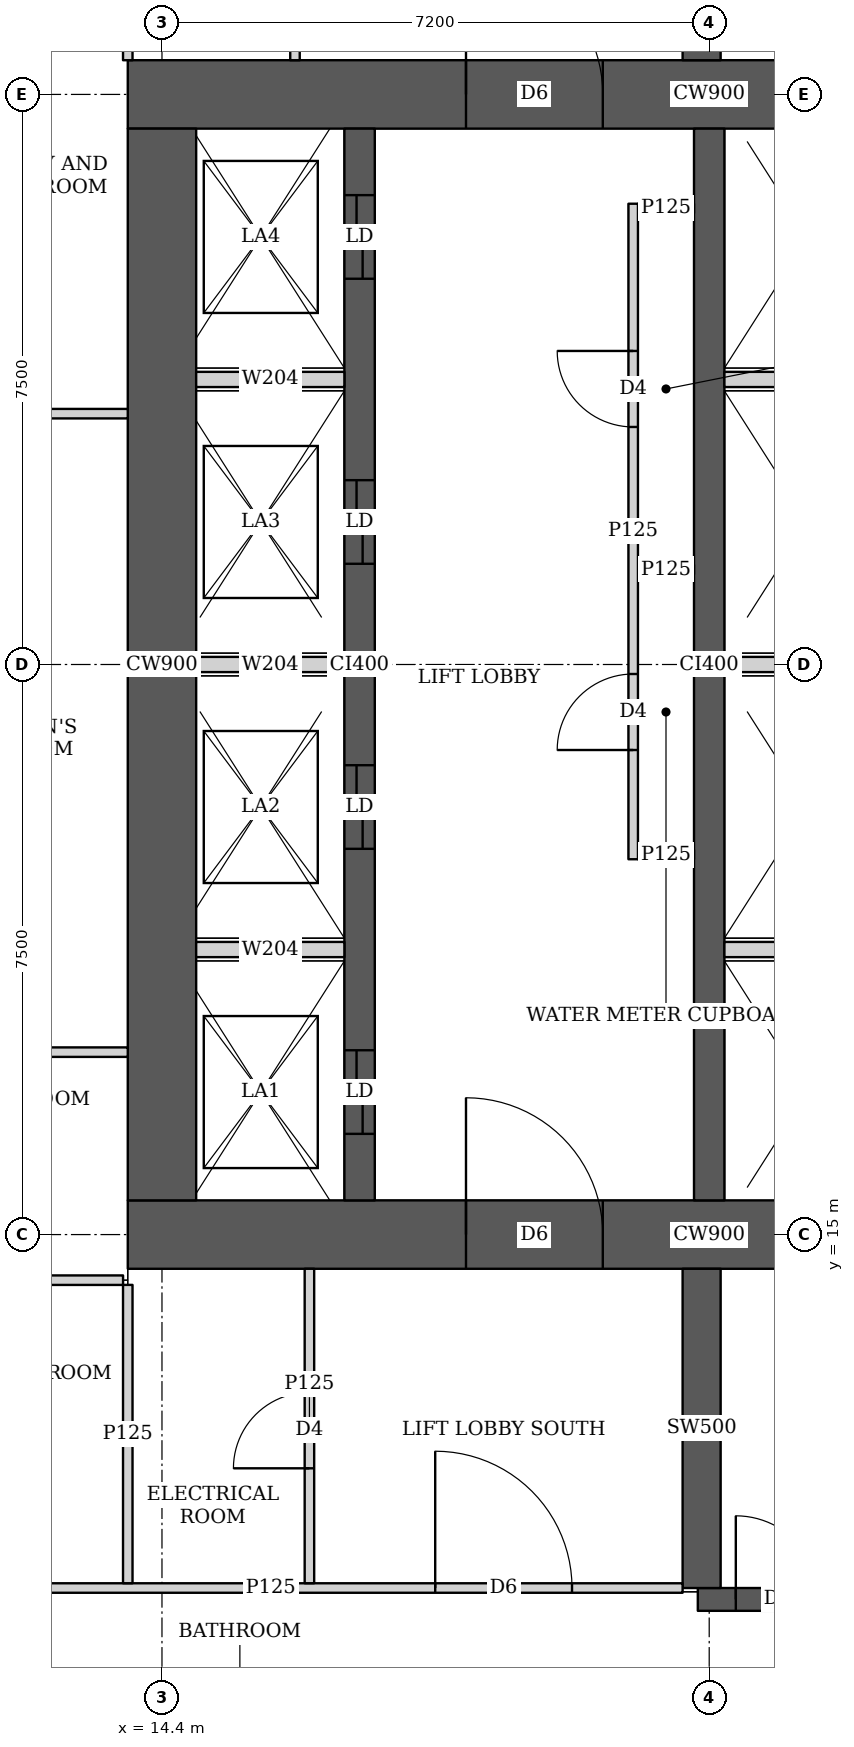
"""IFC4 building model, lengths in metres.
Left out: names, types, materials, properties, quantities, classifications, styles, units other than length and angle.
Written with IfcOpenShell. Run it as: python <this file> out.ifc"""

import sys

from ifc_helpers import new_model, si_unit, direction, frame, frame_2d, origin, place, context, subcontext, project, spatial, rectangle, extrude, element, fill, save


model = new_model("IFC4")
c1 = context("Model", 3, precision=1e-05, world=origin(), true_north=direction((0.0, 1.0)))
c2 = subcontext(c1, "Body", "Model", "MODEL_VIEW")
j1 = project(units=[si_unit("LENGTHUNIT", "METRE"), si_unit("PLANEANGLEUNIT", "RADIAN")], contexts=[c1])
p1 = place(None, origin())
s1 = spatial("IfcSite", under=j1, at=p1, CompositionType="ELEMENT")
p2 = place(p1, origin())
s2 = spatial("IfcBuilding", under=s1, at=p2, CompositionType="ELEMENT")
p3 = place(p2, frame((0.0, 0.0, 111.65)))
s3 = spatial("IfcBuildingStorey", under=s2, at=p3, CompositionType="ELEMENT", Elevation=111.65)
p4 = place(p3, frame((13.95, 15.0, 0.0), z_axis=(0.0, 0.0, 1.0), x_axis=(1.0, 0.0, 0.0)))
e1 = element("IfcWall", 1, at=p4, inside=s3, PredefinedType="SHEAR", context=c2, shape_type="SweptSolid", body=[
    extrude(rectangle(XDim=15.3, YDim=0.9, at=frame_2d((7.65, 0.0))), origin(), (0.0, 0.0, 1.0), 3.75),
])
p5 = place(p4, frame((4.45, 0.0, 0.0)))
e2 = element("IfcOpeningElement", 2, at=p5, cuts=e1, PredefinedType="OPENING", context=c2, shape_type="SweptSolid", body=[
    extrude(rectangle(XDim=1.8, YDim=2.1, at=frame_2d((0.9, 1.05))), frame((0.0, 0.46, 0.0), z_axis=(0.0, -1.0, 0.0), x_axis=(1.0, 0.0, 0.0)), (0.0, 0.0, 1.0), 0.92),
])
p6 = place(p4, frame((10.7, 0.0, 0.0)))
e3 = element("IfcOpeningElement", 3, at=p6, cuts=e1, PredefinedType="OPENING", context=c2, shape_type="SweptSolid", body=[
    extrude(rectangle(XDim=1.1, YDim=2.1, at=frame_2d((0.55, 1.05))), frame((0.0, 0.46, 0.0), z_axis=(0.0, -1.0, 0.0), x_axis=(1.0, 0.0, 0.0)), (0.0, 0.0, 1.0), 0.92),
])
p7 = place(p3, frame((13.95, 30.0, 0.0), z_axis=(0.0, 0.0, 1.0), x_axis=(1.0, 0.0, 0.0)))
e4 = element("IfcWall", 4, at=p7, inside=s3, PredefinedType="SHEAR", context=c2, shape_type="SweptSolid", body=[
    extrude(rectangle(XDim=15.3, YDim=0.9, at=frame_2d((7.65, 0.0))), origin(), (0.0, 0.0, 1.0), 3.75),
])
p8 = place(p7, frame((4.45, 0.0, 0.0)))
e5 = element("IfcOpeningElement", 5, at=p8, cuts=e4, PredefinedType="OPENING", context=c2, shape_type="SweptSolid", body=[
    extrude(rectangle(XDim=1.8, YDim=2.1, at=frame_2d((0.9, 1.05))), frame((0.0, 0.46, 0.0), z_axis=(0.0, -1.0, 0.0), x_axis=(1.0, 0.0, 0.0)), (0.0, 0.0, 1.0), 0.92),
])
p9 = place(p7, frame((10.7, 0.0, 0.0)))
e6 = element("IfcOpeningElement", 6, at=p9, cuts=e4, PredefinedType="OPENING", context=c2, shape_type="SweptSolid", body=[
    extrude(rectangle(XDim=1.1, YDim=2.1, at=frame_2d((0.55, 1.05))), frame((0.0, 0.46, 0.0), z_axis=(0.0, -1.0, 0.0), x_axis=(1.0, 0.0, 0.0)), (0.0, 0.0, 1.0), 0.92),
])
p10 = place(p3, frame((14.4, 15.45, 0.0), z_axis=(0.0, 0.0, 1.0), x_axis=(0.0, 1.0, 0.0)))
e7 = element("IfcWall", 7, at=p10, inside=s3, PredefinedType="SHEAR", context=c2, shape_type="SweptSolid", body=[
    extrude(rectangle(XDim=14.1, YDim=0.9, at=frame_2d((7.05, 0.0))), origin(), (0.0, 0.0, 1.0), 3.75),
])
p11 = place(p3, frame((17.0, 15.45, 0.0), z_axis=(0.0, 0.0, 1.0), x_axis=(0.0, 1.0, 0.0)))
e8 = element("IfcWall", 8, at=p11, inside=s3, PredefinedType="SHEAR", context=c2, shape_type="SweptSolid", body=[
    extrude(rectangle(XDim=14.1, YDim=0.4, at=frame_2d((7.05, 0.0))), origin(), (0.0, 0.0, 1.0), 3.75),
])
p12 = place(p11, frame((0.875, 0.0, 0.0)))
e9 = element("IfcOpeningElement", 9, at=p12, cuts=e8, PredefinedType="OPENING", context=c2, shape_type="SweptSolid", body=[
    extrude(rectangle(XDim=1.1, YDim=2.1, at=frame_2d((0.55, 1.05))), frame((0.0, 0.21, 0.0), z_axis=(0.0, -1.0, 0.0), x_axis=(1.0, 0.0, 0.0)), (0.0, 0.0, 1.0), 0.42),
])
p13 = place(p11, frame((4.625, 0.0, 0.0)))
e10 = element("IfcOpeningElement", 10, at=p13, cuts=e8, PredefinedType="OPENING", context=c2, shape_type="SweptSolid", body=[
    extrude(rectangle(XDim=1.1, YDim=2.1, at=frame_2d((0.55, 1.05))), frame((0.0, 0.21, 0.0), z_axis=(0.0, -1.0, 0.0), x_axis=(1.0, 0.0, 0.0)), (0.0, 0.0, 1.0), 0.42),
])
p14 = place(p11, frame((8.375, 0.0, 0.0)))
e11 = element("IfcOpeningElement", 11, at=p14, cuts=e8, PredefinedType="OPENING", context=c2, shape_type="SweptSolid", body=[
    extrude(rectangle(XDim=1.1, YDim=2.1, at=frame_2d((0.55, 1.05))), frame((0.0, 0.21, 0.0), z_axis=(0.0, -1.0, 0.0), x_axis=(1.0, 0.0, 0.0)), (0.0, 0.0, 1.0), 0.42),
])
p15 = place(p11, frame((12.125, 0.0, 0.0)))
e12 = element("IfcOpeningElement", 12, at=p15, cuts=e8, PredefinedType="OPENING", context=c2, shape_type="SweptSolid", body=[
    extrude(rectangle(XDim=1.1, YDim=2.1, at=frame_2d((0.55, 1.05))), frame((0.0, 0.21, 0.0), z_axis=(0.0, -1.0, 0.0), x_axis=(1.0, 0.0, 0.0)), (0.0, 0.0, 1.0), 0.42),
])
p16 = place(p3, frame((21.6, 15.45, 0.0), z_axis=(0.0, 0.0, 1.0), x_axis=(0.0, 1.0, 0.0)))
e13 = element("IfcWall", 13, at=p16, inside=s3, PredefinedType="SHEAR", context=c2, shape_type="SweptSolid", body=[
    extrude(rectangle(XDim=14.1, YDim=0.4, at=frame_2d((7.05, 0.0))), origin(), (0.0, 0.0, 1.0), 3.75),
])
p17 = place(p3, frame((21.45, 10.2, 0.0), z_axis=(0.0, 0.0, 1.0), x_axis=(1.0, 0.0, 0.0)))
e14 = element("IfcWall", 14, at=p17, inside=s3, PredefinedType="SHEAR", context=c2, shape_type="SweptSolid", body=[
    extrude(rectangle(XDim=7.5, YDim=0.3, at=frame_2d((3.75, 0.0))), origin(), (0.0, 0.0, 1.0), 3.75),
])
p18 = place(p17, frame((0.5, 0.0, 0.0)))
e15 = element("IfcOpeningElement", 15, at=p18, cuts=e14, PredefinedType="OPENING", context=c2, shape_type="SweptSolid", body=[
    extrude(rectangle(XDim=1.1, YDim=2.1, at=frame_2d((0.55, 1.05))), frame((0.0, 0.16, 0.0), z_axis=(0.0, -1.0, 0.0), x_axis=(1.0, 0.0, 0.0)), (0.0, 0.0, 1.0), 0.32),
])
for number, where, z_axis, x_axis in (
    (16, (21.5, 10.35, 0.0), (0.0, 0.0, 1.0), (0.0, 1.0, 0.0)),
    (17, (21.5, 30.45, 0.0), (0.0, 0.0, 1.0), (0.0, 1.0, 0.0)),
):
    element("IfcWall", number, at=place(p3, frame(where, z_axis=z_axis, x_axis=x_axis)), inside=s3, PredefinedType="SHEAR", context=c2, shape_type="SweptSolid", body=[
        extrude(rectangle(XDim=4.2, YDim=0.5, at=frame_2d((2.1, 0.0))), origin(), (0.0, 0.0, 1.0), 3.75),
    ])
p19 = place(p3, frame((10.413, 14.4, 0.0), z_axis=(0.0, 0.0, 1.0), x_axis=(1.0, 0.0, 0.0)))
e18 = element("IfcWall", 18, at=p19, inside=s3, PredefinedType="PARTITIONING", context=c2, shape_type="SweptSolid", body=[
    extrude(rectangle(XDim=3.475, YDim=0.125, at=frame_2d((1.737, 0.0))), origin(), (0.0, 0.0, 1.0), 3.5),
])
for number, where, z_axis, x_axis in (
    (19, (10.413, 17.4, 0.0), (0.0, 0.0, 1.0), (1.0, 0.0, 0.0)),
    (20, (10.413, 25.8, 0.0), (0.0, 0.0, 1.0), (1.0, 0.0, 0.0)),
):
    element("IfcWall", number, at=place(p3, frame(where, z_axis=z_axis, x_axis=x_axis)), inside=s3, PredefinedType="PARTITIONING", context=c2, shape_type="SweptSolid", body=[
        extrude(rectangle(XDim=3.537, YDim=0.125, at=frame_2d((1.769, 0.0))), origin(), (0.0, 0.0, 1.0), 3.5),
    ])
p20 = place(p3, frame((13.95, 10.413, 0.0), z_axis=(0.0, 0.0, 1.0), x_axis=(0.0, 1.0, 0.0)))
e21 = element("IfcWall", 21, at=p20, inside=s3, PredefinedType="PARTITIONING", context=c2, shape_type="SweptSolid", body=[
    extrude(rectangle(XDim=3.925, YDim=0.125, at=frame_2d((1.962, 0.0))), origin(), (0.0, 0.0, 1.0), 3.5),
])
p21 = place(p3, frame((13.95, 30.45, 0.0), z_axis=(0.0, 0.0, 1.0), x_axis=(0.0, 1.0, 0.0)))
e22 = element("IfcWall", 22, at=p21, inside=s3, PredefinedType="PARTITIONING", context=c2, shape_type="SweptSolid", body=[
    extrude(rectangle(XDim=4.137, YDim=0.125, at=frame_2d((2.068, 0.0))), origin(), (0.0, 0.0, 1.0), 3.5),
])
p22 = place(p3, frame((10.413, 10.35, 0.0), z_axis=(0.0, 0.0, 1.0), x_axis=(1.0, 0.0, 0.0)))
e23 = element("IfcWall", 23, at=p22, inside=s3, PredefinedType="PARTITIONING", context=c2, shape_type="SweptSolid", body=[
    extrude(rectangle(XDim=10.837, YDim=0.125, at=frame_2d((5.418, 0.0))), origin(), (0.0, 0.0, 1.0), 3.5),
])
p23 = place(p22, frame((7.582, 0.0, 0.0)))
e24 = element("IfcOpeningElement", 24, at=p23, cuts=e23, PredefinedType="OPENING", context=c2, shape_type="SweptSolid", body=[
    extrude(rectangle(XDim=1.8, YDim=2.1, at=frame_2d((0.9, 1.05))), frame((0.0, 0.073, 0.0), z_axis=(0.0, -1.0, 0.0), x_axis=(1.0, 0.0, 0.0)), (0.0, 0.0, 1.0), 0.145),
])
p24 = place(p3, frame((16.34, 10.413, 0.0), z_axis=(0.0, 0.0, 1.0), x_axis=(0.0, 1.0, 0.0)))
e25 = element("IfcWall", 25, at=p24, inside=s3, PredefinedType="PARTITIONING", context=c2, shape_type="SweptSolid", body=[
    extrude(rectangle(XDim=4.137, YDim=0.125, at=frame_2d((2.068, 0.0))), origin(), (0.0, 0.0, 1.0), 3.5),
])
p25 = place(p24, frame((1.512, 0.0, 0.0)))
e26 = element("IfcOpeningElement", 26, at=p25, cuts=e25, PredefinedType="OPENING", context=c2, shape_type="SweptSolid", body=[
    extrude(rectangle(XDim=1.0, YDim=2.1, at=frame_2d((0.5, 1.05))), frame((0.0, 0.073, 0.0), z_axis=(0.0, -1.0, 0.0), x_axis=(1.0, 0.0, 0.0)), (0.0, 0.0, 1.0), 0.145),
])
p26 = place(p3, frame((16.15, 30.45, 0.0), z_axis=(0.0, 0.0, 1.0), x_axis=(0.0, 1.0, 0.0)))
e27 = element("IfcWall", 27, at=p26, inside=s3, PredefinedType="PARTITIONING", context=c2, shape_type="SweptSolid", body=[
    extrude(rectangle(XDim=4.137, YDim=0.125, at=frame_2d((2.068, 0.0))), origin(), (0.0, 0.0, 1.0), 3.5),
])
p27 = place(p26, frame((1.625, 0.0, 0.0)))
e28 = element("IfcOpeningElement", 28, at=p27, cuts=e27, PredefinedType="OPENING", context=c2, shape_type="SweptSolid", body=[
    extrude(rectangle(XDim=1.0, YDim=2.1, at=frame_2d((0.5, 1.05))), frame((0.0, 0.073, 0.0), z_axis=(0.0, -1.0, 0.0), x_axis=(1.0, 0.0, 0.0)), (0.0, 0.0, 1.0), 0.145),
])
p28 = place(p3, frame((20.6, 19.938, 0.0), z_axis=(0.0, 0.0, 1.0), x_axis=(0.0, 1.0, 0.0)))
e29 = element("IfcWall", 29, at=p28, inside=s3, PredefinedType="PARTITIONING", context=c2, shape_type="SweptSolid", body=[
    extrude(rectangle(XDim=8.624, YDim=0.125, at=frame_2d((4.312, 0.0))), origin(), (0.0, 0.0, 1.0), 3.5),
])
p29 = place(p28, frame((1.437, 0.0, 0.0)))
e30 = element("IfcOpeningElement", 30, at=p29, cuts=e29, PredefinedType="OPENING", context=c2, shape_type="SweptSolid", body=[
    extrude(rectangle(XDim=1.0, YDim=2.1, at=frame_2d((0.5, 1.05))), frame((0.0, 0.073, 0.0), z_axis=(0.0, -1.0, 0.0), x_axis=(1.0, 0.0, 0.0)), (0.0, 0.0, 1.0), 0.145),
])
p30 = place(p28, frame((5.687, 0.0, 0.0)))
e31 = element("IfcOpeningElement", 31, at=p30, cuts=e29, PredefinedType="OPENING", context=c2, shape_type="SweptSolid", body=[
    extrude(rectangle(XDim=1.0, YDim=2.1, at=frame_2d((0.5, 1.05))), frame((0.0, 0.073, 0.0), z_axis=(0.0, -1.0, 0.0), x_axis=(1.0, 0.0, 0.0)), (0.0, 0.0, 1.0), 0.145),
])
for number, where, z_axis, x_axis in (
    (32, (20.663, 20.0, 0.0), (0.0, 0.0, 1.0), (1.0, 0.0, 0.0)),
    (33, (20.663, 28.5, 0.0), (0.0, 0.0, 1.0), (1.0, 0.0, 0.0)),
    (34, (20.663, 23.75, 0.0), (0.0, 0.0, 1.0), (1.0, 0.0, 0.0)),
):
    element("IfcWall", number, at=place(p3, frame(where, z_axis=z_axis, x_axis=x_axis)), inside=s3, PredefinedType="PARTITIONING", context=c2, shape_type="SweptSolid", body=[
        extrude(rectangle(XDim=0.737, YDim=0.125, at=frame_2d((0.368, 0.0))), origin(), (0.0, 0.0, 1.0), 3.5),
    ])
p31 = place(p3, frame((14.85, 18.75, 0.0), z_axis=(0.0, 0.0, 1.0), x_axis=(1.0, 0.0, 0.0)))
e35 = element("IfcWall", 35, at=p31, inside=s3, PredefinedType="SOLIDWALL", context=c2, shape_type="SweptSolid", body=[
    extrude(rectangle(XDim=1.95, YDim=0.2, at=frame_2d((0.975, 0.0))), origin(), (0.0, 0.0, 1.0), 3.5),
])
p32 = place(p3, frame((21.8, 18.75, 0.0), z_axis=(0.0, 0.0, 1.0), x_axis=(1.0, 0.0, 0.0)))
e36 = element("IfcWall", 36, at=p32, inside=s3, PredefinedType="SOLIDWALL", context=c2, shape_type="SweptSolid", body=[
    extrude(rectangle(XDim=2.2, YDim=0.2, at=frame_2d((1.1, 0.0))), origin(), (0.0, 0.0, 1.0), 3.5),
])
p33 = place(p3, frame((14.85, 22.5, 0.0), z_axis=(0.0, 0.0, 1.0), x_axis=(1.0, 0.0, 0.0)))
e37 = element("IfcWall", 37, at=p33, inside=s3, PredefinedType="SOLIDWALL", context=c2, shape_type="SweptSolid", body=[
    extrude(rectangle(XDim=1.95, YDim=0.2, at=frame_2d((0.975, 0.0))), origin(), (0.0, 0.0, 1.0), 3.5),
])
p34 = place(p3, frame((21.8, 22.5, 0.0), z_axis=(0.0, 0.0, 1.0), x_axis=(1.0, 0.0, 0.0)))
e38 = element("IfcWall", 38, at=p34, inside=s3, PredefinedType="SOLIDWALL", context=c2, shape_type="SweptSolid", body=[
    extrude(rectangle(XDim=2.2, YDim=0.2, at=frame_2d((1.1, 0.0))), origin(), (0.0, 0.0, 1.0), 3.5),
])
p35 = place(p3, frame((14.85, 26.25, 0.0), z_axis=(0.0, 0.0, 1.0), x_axis=(1.0, 0.0, 0.0)))
e39 = element("IfcWall", 39, at=p35, inside=s3, PredefinedType="SOLIDWALL", context=c2, shape_type="SweptSolid", body=[
    extrude(rectangle(XDim=1.95, YDim=0.2, at=frame_2d((0.975, 0.0))), origin(), (0.0, 0.0, 1.0), 3.5),
])
p36 = place(p3, frame((21.8, 26.25, 0.0), z_axis=(0.0, 0.0, 1.0), x_axis=(1.0, 0.0, 0.0)))
e40 = element("IfcWall", 40, at=p36, inside=s3, PredefinedType="SOLIDWALL", context=c2, shape_type="SweptSolid", body=[
    extrude(rectangle(XDim=2.2, YDim=0.2, at=frame_2d((1.1, 0.0))), origin(), (0.0, 0.0, 1.0), 3.5),
])
p37 = place(p25, origin())
e41 = element("IfcDoor", 41, at=p37, inside=s3, OperationType="SINGLE_SWING_LEFT", PredefinedType="DOOR", context=c2, shape_type="SweptSolid", body=[
    extrude(rectangle(XDim=1.0, YDim=2.1, at=frame_2d((0.5, 1.05))), frame((0.0, 0.025, 0.0), z_axis=(0.0, -1.0, 0.0), x_axis=(1.0, 0.0, 0.0)), (0.0, 0.0, 1.0), 0.05),
])
fill(e26, e41)
p38 = place(p23, origin())
e42 = element("IfcDoor", 42, at=p38, inside=s3, OperationType="DOUBLE_DOOR_SINGLE_SWING", PredefinedType="DOOR", context=c2, shape_type="SweptSolid", body=[
    extrude(rectangle(XDim=1.8, YDim=2.1, at=frame_2d((0.9, 1.05))), frame((0.0, 0.025, 0.0), z_axis=(0.0, -1.0, 0.0), x_axis=(1.0, 0.0, 0.0)), (0.0, 0.0, 1.0), 0.05),
])
fill(e24, e42)
p39 = place(p29, origin())
e43 = element("IfcDoor", 43, at=p39, inside=s3, OperationType="SINGLE_SWING_LEFT", PredefinedType="DOOR", context=c2, shape_type="SweptSolid", body=[
    extrude(rectangle(XDim=1.0, YDim=2.1, at=frame_2d((0.5, 1.05))), frame((0.0, 0.025, 0.0), z_axis=(0.0, -1.0, 0.0), x_axis=(1.0, 0.0, 0.0)), (0.0, 0.0, 1.0), 0.05),
])
fill(e30, e43)
p40 = place(p30, origin())
e44 = element("IfcDoor", 44, at=p40, inside=s3, OperationType="SINGLE_SWING_RIGHT", PredefinedType="DOOR", context=c2, shape_type="SweptSolid", body=[
    extrude(rectangle(XDim=1.0, YDim=2.1, at=frame_2d((0.5, 1.05))), frame((0.0, 0.025, 0.0), z_axis=(0.0, -1.0, 0.0), x_axis=(1.0, 0.0, 0.0)), (0.0, 0.0, 1.0), 0.05),
])
fill(e31, e44)
p41 = place(p5, origin())
e45 = element("IfcDoor", 45, at=p41, inside=s3, OperationType="DOUBLE_DOOR_SINGLE_SWING", PredefinedType="DOOR", context=c2, shape_type="SweptSolid", body=[
    extrude(rectangle(XDim=1.8, YDim=2.1, at=frame_2d((0.9, 1.05))), frame((0.0, 0.025, 0.0), z_axis=(0.0, -1.0, 0.0), x_axis=(1.0, 0.0, 0.0)), (0.0, 0.0, 1.0), 0.05),
])
fill(e2, e45)
p42 = place(p8, origin())
e46 = element("IfcDoor", 46, at=p42, inside=s3, OperationType="DOUBLE_DOOR_SINGLE_SWING", PredefinedType="DOOR", context=c2, shape_type="SweptSolid", body=[
    extrude(rectangle(XDim=1.8, YDim=2.1, at=frame_2d((0.9, 1.05))), frame((0.0, 0.025, 0.0), z_axis=(0.0, -1.0, 0.0), x_axis=(1.0, 0.0, 0.0)), (0.0, 0.0, 1.0), 0.05),
])
fill(e5, e46)
p43 = place(p12, origin())
e47 = element("IfcDoor", 47, at=p43, inside=s3, OperationType="DOUBLE_DOOR_SLIDING", PredefinedType="DOOR", context=c2, shape_type="SweptSolid", body=[
    extrude(rectangle(XDim=1.1, YDim=2.1, at=frame_2d((0.55, 1.05))), frame((0.0, 0.025, 0.0), z_axis=(0.0, -1.0, 0.0), x_axis=(1.0, 0.0, 0.0)), (0.0, 0.0, 1.0), 0.05),
])
fill(e9, e47)
p44 = place(p13, origin())
e48 = element("IfcDoor", 48, at=p44, inside=s3, OperationType="DOUBLE_DOOR_SLIDING", PredefinedType="DOOR", context=c2, shape_type="SweptSolid", body=[
    extrude(rectangle(XDim=1.1, YDim=2.1, at=frame_2d((0.55, 1.05))), frame((0.0, 0.025, 0.0), z_axis=(0.0, -1.0, 0.0), x_axis=(1.0, 0.0, 0.0)), (0.0, 0.0, 1.0), 0.05),
])
fill(e10, e48)
p45 = place(p14, origin())
e49 = element("IfcDoor", 49, at=p45, inside=s3, OperationType="DOUBLE_DOOR_SLIDING", PredefinedType="DOOR", context=c2, shape_type="SweptSolid", body=[
    extrude(rectangle(XDim=1.1, YDim=2.1, at=frame_2d((0.55, 1.05))), frame((0.0, 0.025, 0.0), z_axis=(0.0, -1.0, 0.0), x_axis=(1.0, 0.0, 0.0)), (0.0, 0.0, 1.0), 0.05),
])
fill(e11, e49)
p46 = place(p15, origin())
e50 = element("IfcDoor", 50, at=p46, inside=s3, OperationType="DOUBLE_DOOR_SLIDING", PredefinedType="DOOR", context=c2, shape_type="SweptSolid", body=[
    extrude(rectangle(XDim=1.1, YDim=2.1, at=frame_2d((0.55, 1.05))), frame((0.0, 0.025, 0.0), z_axis=(0.0, -1.0, 0.0), x_axis=(1.0, 0.0, 0.0)), (0.0, 0.0, 1.0), 0.05),
])
fill(e12, e50)
p47 = place(p18, origin())
e51 = element("IfcDoor", 51, at=p47, inside=s3, OperationType="SINGLE_SWING_LEFT", PredefinedType="DOOR", context=c2, shape_type="SweptSolid", body=[
    extrude(rectangle(XDim=1.1, YDim=2.1, at=frame_2d((0.55, 1.05))), frame((0.0, 0.025, 0.0), z_axis=(0.0, -1.0, 0.0), x_axis=(1.0, 0.0, 0.0)), (0.0, 0.0, 1.0), 0.05),
])
fill(e15, e51)
save(model, sys.argv[1])
